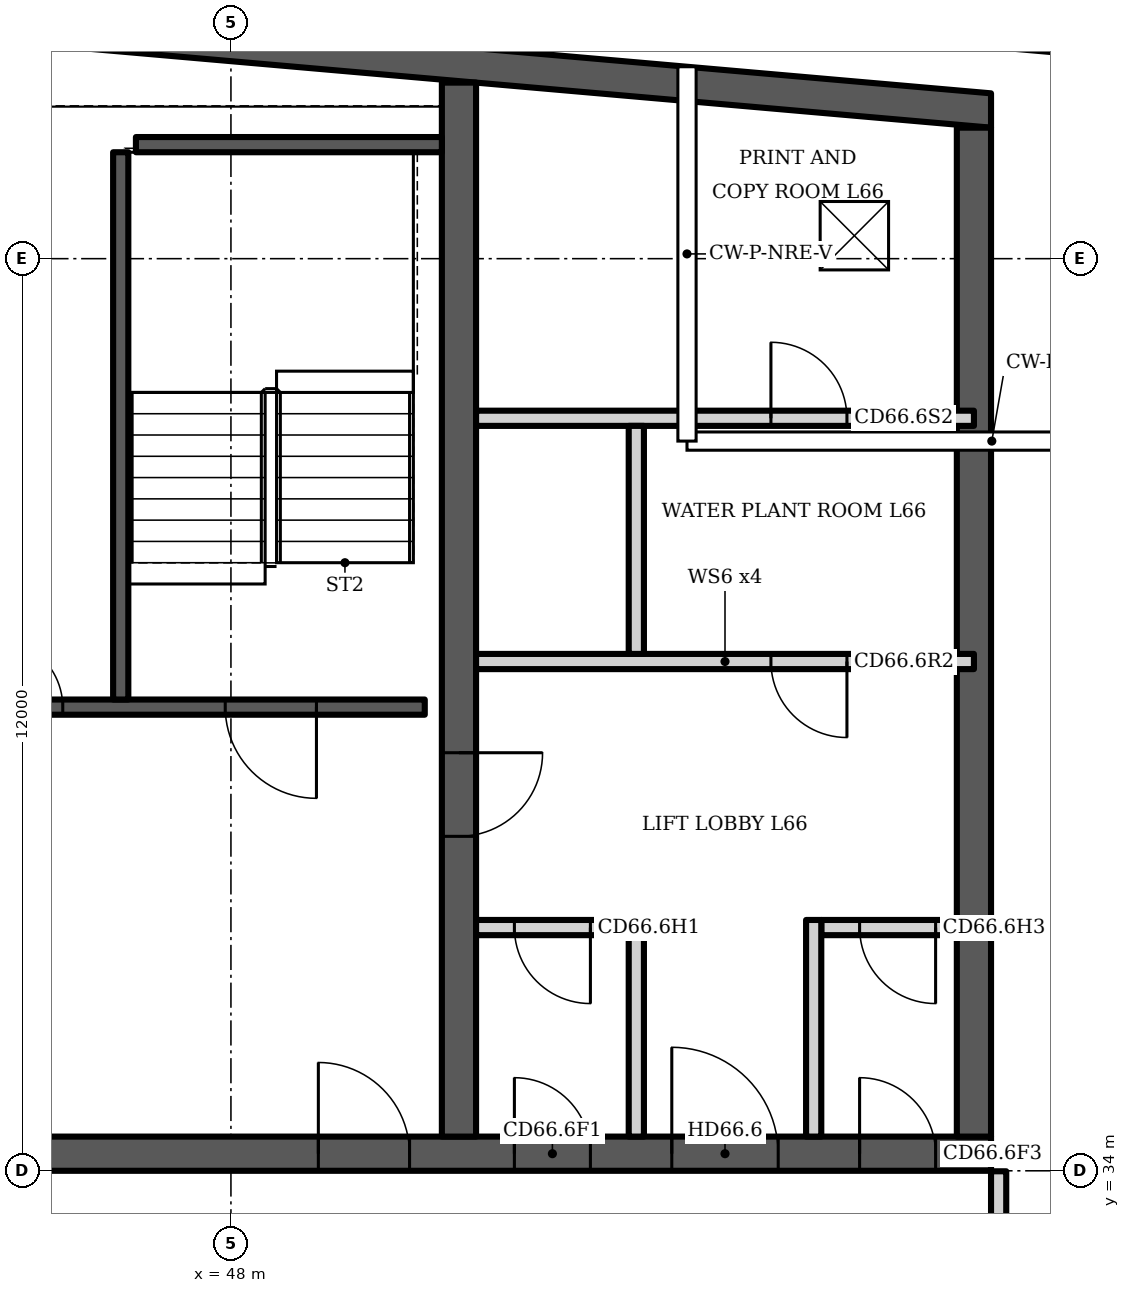
"""IFC4 building model, lengths in metres.
Left out: names, types, materials, properties, quantities, classifications, styles, units other than length and angle.
Written with IfcOpenShell. Run it as: python <this file> out.ifc"""

import sys

from ifc_helpers import new_model, si_unit, direction, frame, frame_2d, origin, origin_2d, place, context, subcontext, project, spatial, polyline, rectangle, outline, extrude, element, fill, save


model = new_model("IFC4")
c1 = context("Model", 3, precision=1e-05, world=origin(), true_north=direction((0.0, 1.0)))
c2 = subcontext(c1, "Body", "Model", "MODEL_VIEW")
j1 = project(units=[si_unit("LENGTHUNIT", "METRE"), si_unit("PLANEANGLEUNIT", "RADIAN")], contexts=[c1])
p1 = place(None, origin())
s1 = spatial("IfcSite", under=j1, at=p1, CompositionType="ELEMENT")
p2 = place(p1, origin())
s2 = spatial("IfcBuilding", under=s1, at=p2, CompositionType="ELEMENT")
p3 = place(p2, frame((0.0, 0.0, 261.1)))
s3 = spatial("IfcBuildingStorey", under=s2, at=p3, CompositionType="ELEMENT", Elevation=261.1)
p4 = place(p3, frame((0.0, 0.0, -0.0)))
e1 = element("IfcWall", 1, at=p4, inside=s3, PredefinedType="SHEAR", context=c2, shape_type="SweptSolid", body=[
    extrude(outline(polyline([(23.0, 48.336), (37.0, 49.561), (58.0, 47.723), (58.0, 48.175), (37.0, 50.012), (23.0, 48.787), (23.0, 48.336)])), origin(), (0.0, 0.0, 1.0), 2.366),
])
p5 = place(p3, frame((23.0, 34.225, 0.0), z_axis=(0.0, 0.0, 1.0), x_axis=(1.0, 0.0, 0.0)))
e2 = element("IfcWall", 2, at=p5, inside=s3, PredefinedType="SHEAR", context=c2, shape_type="SweptSolid", body=[
    extrude(outline(polyline([(0.0, 0.0), (35.0, 0.0), (35.0, 3.2), (30.625, 3.2), (26.25, 3.2), (21.875, 3.2), (17.5, 3.2), (13.125, 3.2), (8.75, 3.2), (4.375, 3.2), (0.0, 2.365), (0.0, 0.0)])), frame((0.0, 0.225, 0.0), z_axis=(0.0, -1.0, 0.0), x_axis=(1.0, 0.0, 0.0)), (0.0, 0.0, 1.0), 0.45),
])
p6 = place(p5, frame((0.65, 0.0, 0.0)))
e3 = element("IfcOpeningElement", 3, at=p6, cuts=e2, PredefinedType="OPENING", context=c2, shape_type="SweptSolid", body=[
    extrude(rectangle(XDim=1.2, YDim=2.1, at=frame_2d((0.6, 1.05))), frame((0.0, 0.235, 0.0), z_axis=(0.0, -1.0, 0.0), x_axis=(1.0, 0.0, 0.0)), (0.0, 0.0, 1.0), 0.47),
])
p7 = place(p5, frame((7.679, 0.0, 0.0)))
e4 = element("IfcOpeningElement", 4, at=p7, cuts=e2, PredefinedType="OPENING", context=c2, shape_type="SweptSolid", body=[
    extrude(rectangle(XDim=1.1, YDim=2.1, at=frame_2d((0.55, 1.05))), frame((0.0, 0.235, 0.0), z_axis=(0.0, -1.0, 0.0), x_axis=(1.0, 0.0, 0.0)), (0.0, 0.0, 1.0), 0.47),
])
p8 = place(p5, frame((12.221, 0.0, 0.0)))
e5 = element("IfcOpeningElement", 5, at=p8, cuts=e2, PredefinedType="OPENING", context=c2, shape_type="SweptSolid", body=[
    extrude(rectangle(XDim=1.1, YDim=2.1, at=frame_2d((0.55, 1.05))), frame((0.0, 0.235, 0.0), z_axis=(0.0, -1.0, 0.0), x_axis=(1.0, 0.0, 0.0)), (0.0, 0.0, 1.0), 0.47),
])
p9 = place(p5, frame((9.8, 0.0, 0.0)))
e6 = element("IfcOpeningElement", 6, at=p9, cuts=e2, PredefinedType="OPENING", context=c2, shape_type="SweptSolid", body=[
    extrude(rectangle(XDim=1.4, YDim=2.1, at=frame_2d((0.7, 1.05))), frame((0.0, 0.235, 0.0), z_axis=(0.0, -1.0, 0.0), x_axis=(1.0, 0.0, 0.0)), (0.0, 0.0, 1.0), 0.47),
])
p10 = place(p5, frame((14.679, 0.0, 0.0)))
e7 = element("IfcOpeningElement", 7, at=p10, cuts=e2, PredefinedType="OPENING", context=c2, shape_type="SweptSolid", body=[
    extrude(rectangle(XDim=1.1, YDim=2.1, at=frame_2d((0.55, 1.05))), frame((0.0, 0.235, 0.0), z_axis=(0.0, -1.0, 0.0), x_axis=(1.0, 0.0, 0.0)), (0.0, 0.0, 1.0), 0.47),
])
p11 = place(p5, frame((19.221, 0.0, 0.0)))
e8 = element("IfcOpeningElement", 8, at=p11, cuts=e2, PredefinedType="OPENING", context=c2, shape_type="SweptSolid", body=[
    extrude(rectangle(XDim=1.1, YDim=2.1, at=frame_2d((0.55, 1.05))), frame((0.0, 0.235, 0.0), z_axis=(0.0, -1.0, 0.0), x_axis=(1.0, 0.0, 0.0)), (0.0, 0.0, 1.0), 0.47),
])
p12 = place(p5, frame((26.15, 0.0, 0.0)))
e9 = element("IfcOpeningElement", 9, at=p12, cuts=e2, PredefinedType="OPENING", context=c2, shape_type="SweptSolid", body=[
    extrude(rectangle(XDim=1.2, YDim=2.1, at=frame_2d((0.6, 1.05))), frame((0.0, 0.235, 0.0), z_axis=(0.0, -1.0, 0.0), x_axis=(1.0, 0.0, 0.0)), (0.0, 0.0, 1.0), 0.47),
])
p13 = place(p5, frame((28.729, 0.0, 0.0)))
e10 = element("IfcOpeningElement", 10, at=p13, cuts=e2, PredefinedType="OPENING", context=c2, shape_type="SweptSolid", body=[
    extrude(rectangle(XDim=1.0, YDim=2.1, at=frame_2d((0.5, 1.05))), frame((0.0, 0.235, 0.0), z_axis=(0.0, -1.0, 0.0), x_axis=(1.0, 0.0, 0.0)), (0.0, 0.0, 1.0), 0.47),
])
p14 = place(p5, frame((33.271, 0.0, 0.0)))
e11 = element("IfcOpeningElement", 11, at=p14, cuts=e2, PredefinedType="OPENING", context=c2, shape_type="SweptSolid", body=[
    extrude(rectangle(XDim=1.0, YDim=2.1, at=frame_2d((0.5, 1.05))), frame((0.0, 0.235, 0.0), z_axis=(0.0, -1.0, 0.0), x_axis=(1.0, 0.0, 0.0)), (0.0, 0.0, 1.0), 0.47),
])
p15 = place(p5, frame((30.8, 0.0, 0.0)))
e12 = element("IfcOpeningElement", 12, at=p15, cuts=e2, PredefinedType="OPENING", context=c2, shape_type="SweptSolid", body=[
    extrude(rectangle(XDim=1.4, YDim=2.1, at=frame_2d((0.7, 1.05))), frame((0.0, 0.235, 0.0), z_axis=(0.0, -1.0, 0.0), x_axis=(1.0, 0.0, 0.0)), (0.0, 0.0, 1.0), 0.47),
])
p16 = place(p3, frame((51.0, 34.45, 0.0), z_axis=(0.0, 0.0, 1.0), x_axis=(0.0, 1.0, 0.0)))
e13 = element("IfcWall", 13, at=p16, inside=s3, PredefinedType="SHEAR", context=c2, shape_type="SweptSolid", body=[
    extrude(rectangle(XDim=13.866, YDim=0.45, at=frame_2d((6.933, 0.0))), origin(), (0.0, 0.0, 1.0), 3.2),
])
p17 = place(p16, frame((3.95, 0.0, 0.0)))
e14 = element("IfcOpeningElement", 14, at=p17, cuts=e13, PredefinedType="OPENING", context=c2, shape_type="SweptSolid", body=[
    extrude(rectangle(XDim=1.1, YDim=2.1, at=frame_2d((0.55, 1.05))), frame((0.0, 0.235, 0.0), z_axis=(0.0, -1.0, 0.0), x_axis=(1.0, 0.0, 0.0)), (0.0, 0.0, 1.0), 0.47),
])
p18 = place(p3, frame((57.775, 34.45, 0.0), z_axis=(0.0, 0.0, 1.0), x_axis=(0.0, 1.0, 0.0)))
e15 = element("IfcWall", 15, at=p18, inside=s3, PredefinedType="SHEAR", context=c2, shape_type="SweptSolid", body=[
    extrude(rectangle(XDim=13.273, YDim=0.45, at=frame_2d((6.637, 0.0))), origin(), (0.0, 0.0, 1.0), 3.2),
])
p19 = place(p3, frame((40.5, 50.444, 0.0), z_axis=(0.0, 0.0, 1.0), x_axis=(0.996195, -0.087148, 0.0)))
e16 = element("IfcWall", 16, at=p19, inside=s3, PredefinedType="PARAPET", context=c2, shape_type="SweptSolid", body=[
    extrude(rectangle(XDim=20.829, YDim=0.25, at=frame_2d((10.415, 0.0))), origin(), (0.0, 0.0, 1.0), 1.1),
])
p20 = place(p3, frame((44.225, 40.1, 0.0), z_axis=(0.0, 0.0, 1.0), x_axis=(1.0, 0.0, 0.0)))
e17 = element("IfcWall", 17, at=p20, inside=s3, PredefinedType="SHEAR", context=c2, shape_type="SweptSolid", body=[
    extrude(rectangle(XDim=6.325, YDim=0.2, at=frame_2d((3.163, 0.0))), origin(), (0.0, 0.0, 1.0), 2.8),
])
p21 = place(p20, frame((3.7, 0.0, 0.0)))
e18 = element("IfcOpeningElement", 18, at=p21, cuts=e17, PredefinedType="OPENING", context=c2, shape_type="SweptSolid", body=[
    extrude(rectangle(XDim=1.2, YDim=2.1, at=frame_2d((0.6, 1.05))), frame((0.0, 0.11, 0.0), z_axis=(0.0, -1.0, 0.0), x_axis=(1.0, 0.0, 0.0)), (0.0, 0.0, 1.0), 0.22),
])
p22 = place(p20, frame((0.663, 0.0, 0.0)))
e19 = element("IfcOpeningElement", 19, at=p22, cuts=e17, PredefinedType="OPENING", context=c2, shape_type="SweptSolid", body=[
    extrude(rectangle(XDim=0.9, YDim=2.1, at=frame_2d((0.45, 1.05))), frame((0.0, 0.11, 0.0), z_axis=(0.0, -1.0, 0.0), x_axis=(1.0, 0.0, 0.0)), (0.0, 0.0, 1.0), 0.22),
])
p23 = place(p3, frame((46.55, 40.2, 0.0), z_axis=(0.0, 0.0, 1.0), x_axis=(0.0, 1.0, 0.0)))
e20 = element("IfcWall", 20, at=p23, inside=s3, PredefinedType="SHEAR", context=c2, shape_type="SweptSolid", body=[
    extrude(rectangle(XDim=7.2, YDim=0.2, at=frame_2d((3.6, 0.0))), origin(), (0.0, 0.0, 1.0), 2.8),
])
p24 = place(p3, frame((46.75, 47.5, 0.0), z_axis=(0.0, 0.0, 1.0), x_axis=(1.0, 0.0, 0.0)))
e21 = element("IfcWall", 21, at=p24, inside=s3, PredefinedType="SHEAR", context=c2, shape_type="SweptSolid", body=[
    extrude(rectangle(XDim=4.025, YDim=0.2, at=frame_2d((2.012, 0.0))), origin(), (0.0, 0.0, 1.0), 2.8),
])
p25 = place(p3, frame((51.225, 37.2, 0.0), z_axis=(0.0, 0.0, 1.0), x_axis=(1.0, 0.0, 0.0)))
e22 = element("IfcWall", 22, at=p25, inside=s3, PredefinedType="PARTITIONING", context=c2, shape_type="SweptSolid", body=[
    extrude(rectangle(XDim=2.008, YDim=0.2, at=frame_2d((1.004, 0.0))), origin(), (0.0, 0.0, 1.0), 2.8),
])
p26 = place(p25, frame((0.504, 0.0, 0.0)))
e23 = element("IfcOpeningElement", 23, at=p26, cuts=e22, PredefinedType="OPENING", context=c2, shape_type="SweptSolid", body=[
    extrude(rectangle(XDim=1.0, YDim=2.1, at=frame_2d((0.5, 1.05))), frame((0.0, 0.11, 0.0), z_axis=(0.0, -1.0, 0.0), x_axis=(1.0, 0.0, 0.0)), (0.0, 0.0, 1.0), 0.22),
])
p27 = place(p3, frame((55.767, 37.2, 0.0), z_axis=(0.0, 0.0, 1.0), x_axis=(1.0, 0.0, 0.0)))
e24 = element("IfcWall", 24, at=p27, inside=s3, PredefinedType="PARTITIONING", context=c2, shape_type="SweptSolid", body=[
    extrude(rectangle(XDim=2.008, YDim=0.2, at=frame_2d((1.004, 0.0))), origin(), (0.0, 0.0, 1.0), 2.8),
])
p28 = place(p27, frame((0.504, 0.0, 0.0)))
e25 = element("IfcOpeningElement", 25, at=p28, cuts=e24, PredefinedType="OPENING", context=c2, shape_type="SweptSolid", body=[
    extrude(rectangle(XDim=1.0, YDim=2.1, at=frame_2d((0.5, 1.05))), frame((0.0, 0.11, 0.0), z_axis=(0.0, -1.0, 0.0), x_axis=(1.0, 0.0, 0.0)), (0.0, 0.0, 1.0), 0.22),
])
p29 = place(p3, frame((51.225, 40.7, 0.0), z_axis=(0.0, 0.0, 1.0), x_axis=(1.0, 0.0, 0.0)))
e26 = element("IfcWall", 26, at=p29, inside=s3, PredefinedType="PARTITIONING", context=c2, shape_type="SweptSolid", body=[
    extrude(rectangle(XDim=6.55, YDim=0.2, at=frame_2d((3.275, 0.0))), origin(), (0.0, 0.0, 1.0), 2.8),
])
p30 = place(p29, frame((3.879, 0.0, 0.0)))
e27 = element("IfcOpeningElement", 27, at=p30, cuts=e26, PredefinedType="OPENING", context=c2, shape_type="SweptSolid", body=[
    extrude(rectangle(XDim=1.0, YDim=2.1, at=frame_2d((0.5, 1.05))), frame((0.0, 0.11, 0.0), z_axis=(0.0, -1.0, 0.0), x_axis=(1.0, 0.0, 0.0)), (0.0, 0.0, 1.0), 0.22),
])
p31 = place(p3, frame((51.225, 43.9, 0.0), z_axis=(0.0, 0.0, 1.0), x_axis=(1.0, 0.0, 0.0)))
e28 = element("IfcWall", 28, at=p31, inside=s3, PredefinedType="PARTITIONING", context=c2, shape_type="SweptSolid", body=[
    extrude(rectangle(XDim=6.55, YDim=0.2, at=frame_2d((3.275, 0.0))), origin(), (0.0, 0.0, 1.0), 2.8),
])
p32 = place(p31, frame((3.879, 0.0, 0.0)))
e29 = element("IfcOpeningElement", 29, at=p32, cuts=e28, PredefinedType="OPENING", context=c2, shape_type="SweptSolid", body=[
    extrude(rectangle(XDim=1.0, YDim=2.1, at=frame_2d((0.5, 1.05))), frame((0.0, 0.11, 0.0), z_axis=(0.0, -1.0, 0.0), x_axis=(1.0, 0.0, 0.0)), (0.0, 0.0, 1.0), 0.22),
])
p33 = place(p3, frame((0.0, 0.0, -0.0)))
e30 = element("IfcWall", 30, at=p33, inside=s3, PredefinedType="PARTITIONING", context=c2, shape_type="SweptSolid", body=[
    extrude(outline(polyline([(53.233, 34.45), (53.233, 37.3), (53.433, 37.3), (53.433, 34.45), (53.233, 34.45)])), origin(), (0.0, 0.0, 1.0), 2.8),
])
p34 = place(p3, frame((0.0, 0.0, -0.0)))
e31 = element("IfcWall", 31, at=p34, inside=s3, PredefinedType="PARTITIONING", context=c2, shape_type="SweptSolid", body=[
    extrude(outline(polyline([(55.567, 34.45), (55.567, 37.3), (55.767, 37.3), (55.767, 34.45), (55.567, 34.45)])), origin(), (0.0, 0.0, 1.0), 2.8),
])
p35 = place(p3, frame((0.0, 0.0, -0.0)))
e32 = element("IfcWall", 32, at=p35, inside=s3, PredefinedType="PARTITIONING", context=c2, shape_type="SweptSolid", body=[
    extrude(outline(polyline([(53.433, 40.8), (53.433, 43.8), (53.233, 43.8), (53.233, 40.8), (53.433, 40.8)])), origin(), (0.0, 0.0, 1.0), 2.8),
])
p36 = place(p3, frame((58.1, 30.4, 0.0), z_axis=(0.0, 0.0, 1.0), x_axis=(0.0, 1.0, 0.0)))
e33 = element("IfcWall", 33, at=p36, inside=s3, PredefinedType="PARTITIONING", context=c2, shape_type="SweptSolid", body=[
    extrude(rectangle(XDim=3.594, YDim=0.2, at=frame_2d((1.797, 0.0))), origin(), (0.0, 0.0, 1.0), 2.8),
])
p37 = place(p3, frame((0.0, 0.0, -0.4)))
p38 = place(p37, frame((56.202, 46.302, 0.0)))
p39 = place(p38, frame((0.0, 0.0, 0.36)))
e34 = element("IfcDoor", 34, at=p39, inside=s3, OperationType="SINGLE_SWING_LEFT", PredefinedType="TRAPDOOR", context=c2, shape_type="SweptSolid", body=[
    extrude(rectangle(XDim=0.9, YDim=0.9, at=origin_2d()), origin(), (0.0, 0.0, 1.0), 0.05),
])
p40 = place(p21, origin())
e35 = element("IfcDoor", 35, at=p40, inside=s3, OperationType="SINGLE_SWING_RIGHT", PredefinedType="DOOR", context=c2, shape_type="SweptSolid", body=[
    extrude(rectangle(XDim=1.2, YDim=2.1, at=frame_2d((0.6, 1.05))), frame((0.0, 0.025, 0.0), z_axis=(0.0, -1.0, 0.0), x_axis=(1.0, 0.0, 0.0)), (0.0, 0.0, 1.0), 0.05),
])
fill(e18, e35)
p41 = place(p22, origin())
e36 = element("IfcDoor", 36, at=p41, inside=s3, OperationType="SINGLE_SWING_LEFT", PredefinedType="DOOR", context=c2, shape_type="SweptSolid", body=[
    extrude(rectangle(XDim=0.9, YDim=2.1, at=frame_2d((0.45, 1.05))), frame((0.0, 0.025, 0.0), z_axis=(0.0, -1.0, 0.0), x_axis=(1.0, 0.0, 0.0)), (0.0, 0.0, 1.0), 0.05),
])
fill(e19, e36)
p42 = place(p12, origin())
e37 = element("IfcDoor", 37, at=p42, inside=s3, OperationType="SINGLE_SWING_LEFT", PredefinedType="DOOR", context=c2, shape_type="SweptSolid", body=[
    extrude(rectangle(XDim=1.2, YDim=2.1, at=frame_2d((0.6, 1.05))), frame((0.0, 0.025, 0.0), z_axis=(0.0, -1.0, 0.0), x_axis=(1.0, 0.0, 0.0)), (0.0, 0.0, 1.0), 0.05),
])
fill(e9, e37)
p43 = place(p13, origin())
e38 = element("IfcDoor", 38, at=p43, inside=s3, OperationType="SINGLE_SWING_LEFT", PredefinedType="DOOR", context=c2, shape_type="SweptSolid", body=[
    extrude(rectangle(XDim=1.0, YDim=2.1, at=frame_2d((0.5, 1.05))), frame((0.0, 0.025, 0.0), z_axis=(0.0, -1.0, 0.0), x_axis=(1.0, 0.0, 0.0)), (0.0, 0.0, 1.0), 0.05),
])
fill(e10, e38)
p44 = place(p26, origin())
e39 = element("IfcDoor", 39, at=p44, inside=s3, OperationType="SINGLE_SWING_RIGHT", PredefinedType="DOOR", context=c2, shape_type="SweptSolid", body=[
    extrude(rectangle(XDim=1.0, YDim=2.1, at=frame_2d((0.5, 1.05))), frame((0.0, 0.025, 0.0), z_axis=(0.0, -1.0, 0.0), x_axis=(1.0, 0.0, 0.0)), (0.0, 0.0, 1.0), 0.05),
])
fill(e23, e39)
p45 = place(p14, origin())
e40 = element("IfcDoor", 40, at=p45, inside=s3, OperationType="SINGLE_SWING_LEFT", PredefinedType="DOOR", context=c2, shape_type="SweptSolid", body=[
    extrude(rectangle(XDim=1.0, YDim=2.1, at=frame_2d((0.5, 1.05))), frame((0.0, 0.025, 0.0), z_axis=(0.0, -1.0, 0.0), x_axis=(1.0, 0.0, 0.0)), (0.0, 0.0, 1.0), 0.05),
])
fill(e11, e40)
p46 = place(p28, origin())
e41 = element("IfcDoor", 41, at=p46, inside=s3, OperationType="SINGLE_SWING_RIGHT", PredefinedType="DOOR", context=c2, shape_type="SweptSolid", body=[
    extrude(rectangle(XDim=1.0, YDim=2.1, at=frame_2d((0.5, 1.05))), frame((0.0, 0.025, 0.0), z_axis=(0.0, -1.0, 0.0), x_axis=(1.0, 0.0, 0.0)), (0.0, 0.0, 1.0), 0.05),
])
fill(e25, e41)
p47 = place(p15, origin())
e42 = element("IfcDoor", 42, at=p47, inside=s3, OperationType="DOUBLE_DOOR_SINGLE_SWING", PredefinedType="DOOR", context=c2, shape_type="SweptSolid", body=[
    extrude(rectangle(XDim=1.4, YDim=2.1, at=frame_2d((0.7, 1.05))), frame((0.0, 0.025, 0.0), z_axis=(0.0, -1.0, 0.0), x_axis=(1.0, 0.0, 0.0)), (0.0, 0.0, 1.0), 0.05),
])
fill(e12, e42)
p48 = place(p30, origin())
e43 = element("IfcDoor", 43, at=p48, inside=s3, OperationType="SINGLE_SWING_RIGHT", PredefinedType="DOOR", context=c2, shape_type="SweptSolid", body=[
    extrude(rectangle(XDim=1.0, YDim=2.1, at=frame_2d((0.5, 1.05))), frame((0.0, 0.025, 0.0), z_axis=(0.0, -1.0, 0.0), x_axis=(1.0, 0.0, 0.0)), (0.0, 0.0, 1.0), 0.05),
])
fill(e27, e43)
p49 = place(p32, origin())
e44 = element("IfcDoor", 44, at=p49, inside=s3, OperationType="SINGLE_SWING_LEFT", PredefinedType="DOOR", context=c2, shape_type="SweptSolid", body=[
    extrude(rectangle(XDim=1.0, YDim=2.1, at=frame_2d((0.5, 1.05))), frame((0.0, 0.025, 0.0), z_axis=(0.0, -1.0, 0.0), x_axis=(1.0, 0.0, 0.0)), (0.0, 0.0, 1.0), 0.05),
])
fill(e29, e44)
p50 = place(p17, origin())
e45 = element("IfcDoor", 45, at=p50, inside=s3, OperationType="SINGLE_SWING_RIGHT", PredefinedType="DOOR", context=c2, shape_type="SweptSolid", body=[
    extrude(rectangle(XDim=1.1, YDim=2.1, at=frame_2d((0.55, 1.05))), frame((0.0, 0.025, 0.0), z_axis=(0.0, -1.0, 0.0), x_axis=(1.0, 0.0, 0.0)), (0.0, 0.0, 1.0), 0.05),
])
fill(e14, e45)
save(model, sys.argv[1])
